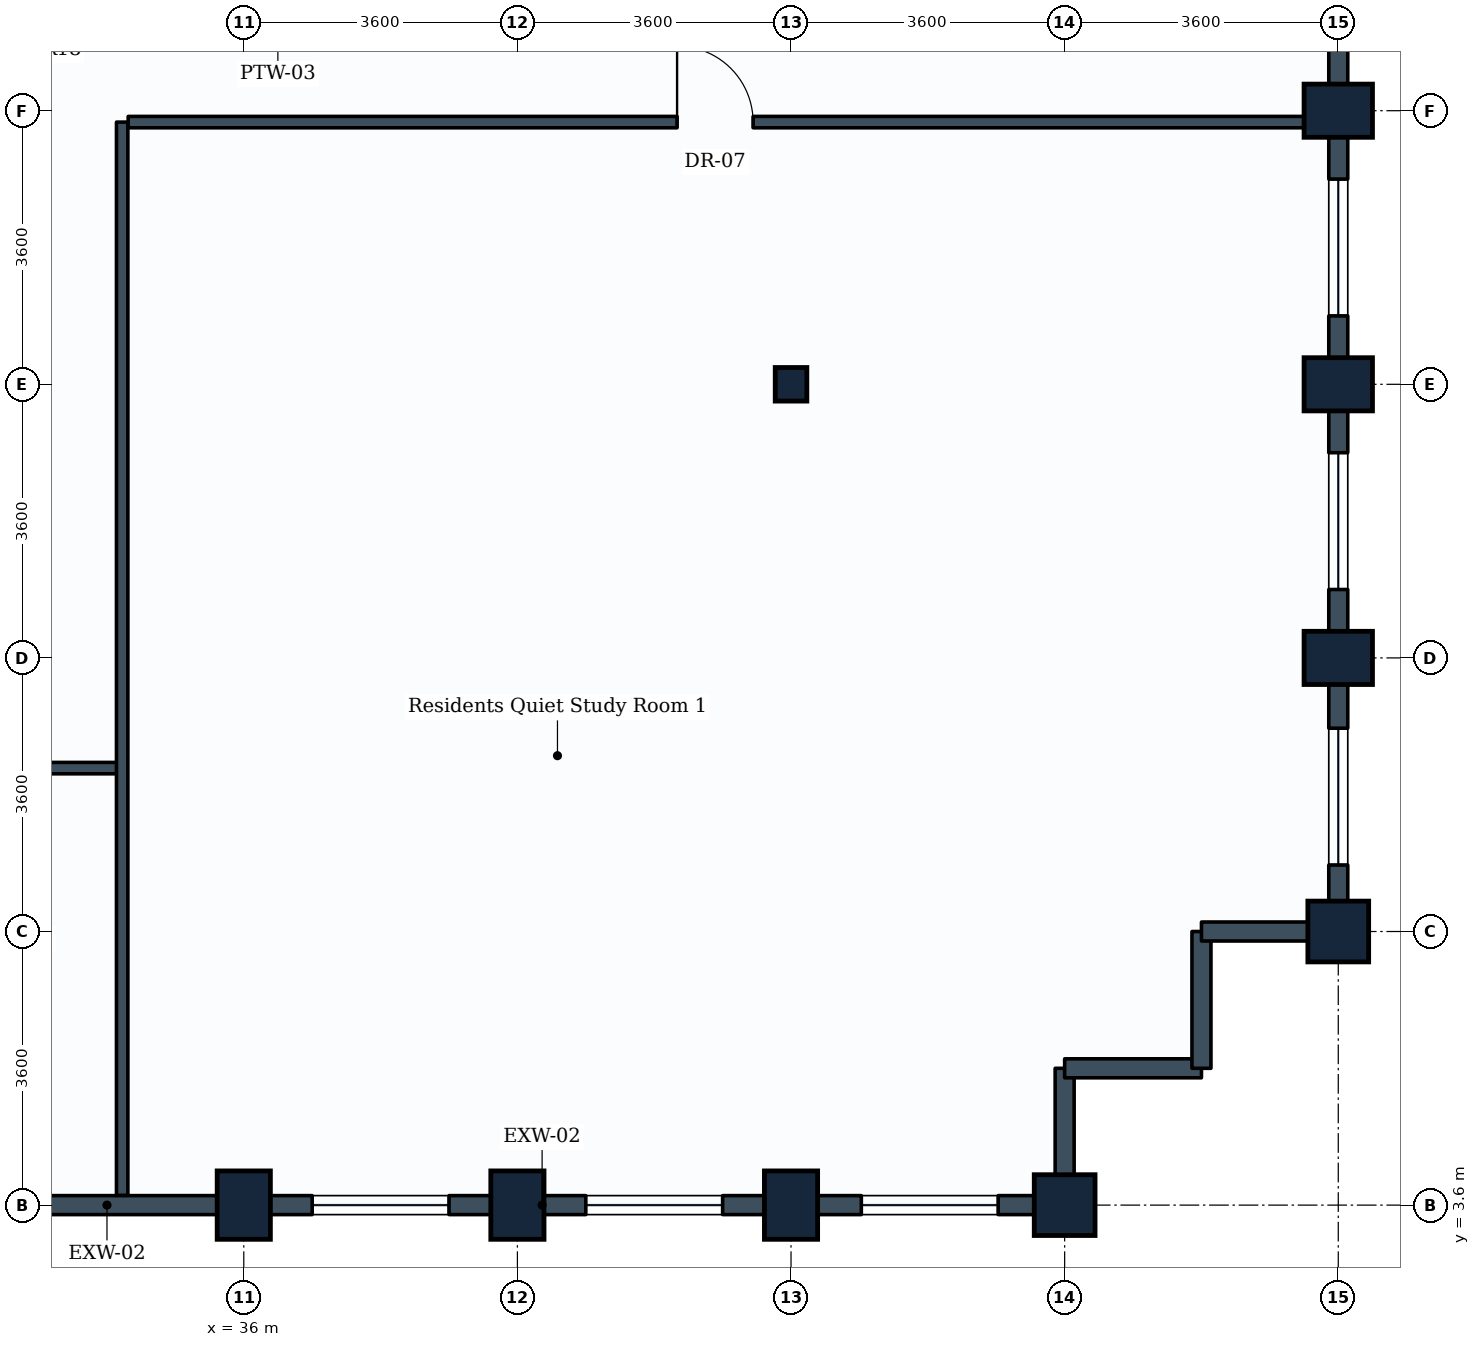
"""IFC4 building model, lengths in metres.
Left out: names, types, materials, properties, quantities, classifications, styles, units other than length and angle.
Written with IfcOpenShell. Run it as: python <this file> out.ifc"""

import sys

from ifc_helpers import new_model, si_unit, direction, frame, frame_2d, origin, origin_2d, place, context, subcontext, project, spatial, rectangle, i_section, extrude, element, fill, save


model = new_model("IFC4")
c1 = context("Model", 3, precision=1e-05, world=origin(), true_north=direction((0.0, 1.0)))
c2 = subcontext(c1, "Body", "Model", "MODEL_VIEW")
j1 = project(units=[si_unit("LENGTHUNIT", "METRE"), si_unit("PLANEANGLEUNIT", "RADIAN")], contexts=[c1])
p1 = place(None, origin())
s1 = spatial("IfcSite", under=j1, at=p1, CompositionType="ELEMENT")
p2 = place(p1, origin())
s2 = spatial("IfcBuilding", under=s1, at=p2, CompositionType="ELEMENT")
p3 = place(p2, frame((0.0, 0.0, 190.0)))
s3 = spatial("IfcBuildingStorey", under=s2, at=p3, CompositionType="ELEMENT", Elevation=190.0)
for number, where, z_axis, x_axis in (
    (1, (36.0, 3.6, 0.0), (0.0, 0.0, 1.0), (1.0, 0.0, 0.0)),
    (2, (39.6, 3.6, 0.0), (0.0, 0.0, 1.0), (1.0, 0.0, 0.0)),
    (3, (43.2, 3.6, 0.0), (0.0, 0.0, 1.0), (1.0, 0.0, 0.0)),
):
    element("IfcColumn", number, at=place(p3, frame(where, z_axis=z_axis, x_axis=x_axis)), inside=s3, PredefinedType="COLUMN", context=c2, shape_type="SweptSolid", body=[
        extrude(rectangle(XDim=0.7, YDim=0.9, at=origin_2d()), origin(), (0.0, 0.0, 1.0), 3.8),
    ])
p4 = place(p3, frame((43.2, 14.4, 0.0), z_axis=(0.0, 0.0, 1.0), x_axis=(1.0, 0.0, 0.0)))
e4 = element("IfcColumn", 4, at=p4, inside=s3, PredefinedType="COLUMN", context=c2, shape_type="SweptSolid", body=[
    extrude(i_section(OverallWidth=0.416, OverallDepth=0.442, WebThickness=0.025, FlangeThickness=0.041, FilletRadius=0.015, at=origin_2d()), origin(), (0.0, 0.0, 1.0), 3.8),
])
for number, where, z_axis, x_axis in (
    (5, (46.8, 3.6, 0.0), (0.0, 0.0, 1.0), (1.0, 0.0, 0.0)),
    (6, (50.4, 7.2, 0.0), (0.0, 0.0, 1.0), (1.0, 0.0, 0.0)),
):
    element("IfcColumn", number, at=place(p3, frame(where, z_axis=z_axis, x_axis=x_axis)), inside=s3, PredefinedType="COLUMN", context=c2, shape_type="SweptSolid", body=[
        extrude(rectangle(XDim=0.8, YDim=0.8, at=origin_2d()), origin(), (0.0, 0.0, 1.0), 3.8),
    ])
for number, where, z_axis, x_axis in (
    (7, (50.4, 10.8, 0.0), (0.0, 0.0, 1.0), (0.0, 1.0, 0.0)),
    (8, (50.4, 14.4, 0.0), (0.0, 0.0, 1.0), (0.0, 1.0, 0.0)),
    (9, (50.4, 18.0, 0.0), (0.0, 0.0, 1.0), (0.0, 1.0, 0.0)),
):
    element("IfcColumn", number, at=place(p3, frame(where, z_axis=z_axis, x_axis=x_axis)), inside=s3, PredefinedType="COLUMN", context=c2, shape_type="SweptSolid", body=[
        extrude(rectangle(XDim=0.7, YDim=0.9, at=origin_2d()), origin(), (0.0, 0.0, 1.0), 3.8),
    ])
p5 = place(p3, frame((36.0, 3.6, 0.0), z_axis=(0.0, 0.0, 1.0), x_axis=(-1.0, 0.0, 0.0)))
e10 = element("IfcWall", 10, at=p5, inside=s3, PredefinedType="STANDARD", context=c2, shape_type="SweptSolid", body=[
    extrude(rectangle(XDim=3.6, YDim=0.25, at=frame_2d((1.8, 0.0))), origin(), (0.0, 0.0, 1.0), 2.93),
])
p6 = place(p3, frame((39.6, 3.6, 0.0), z_axis=(0.0, 0.0, 1.0), x_axis=(-1.0, 0.0, 0.0)))
e11 = element("IfcWall", 11, at=p6, inside=s3, PredefinedType="STANDARD", context=c2, shape_type="SweptSolid", body=[
    extrude(rectangle(XDim=3.6, YDim=0.25, at=frame_2d((1.8, 0.0))), origin(), (0.0, 0.0, 1.0), 2.93),
])
p7 = place(p6, frame((0.9, 0.0, 0.85)))
e12 = element("IfcOpeningElement", 12, at=p7, cuts=e11, PredefinedType="OPENING", context=c2, shape_type="SweptSolid", body=[
    extrude(rectangle(XDim=1.8, YDim=1.35, at=frame_2d((0.9, 0.675))), frame((0.0, 0.135, 0.0), z_axis=(0.0, -1.0, 0.0), x_axis=(1.0, 0.0, 0.0)), (0.0, 0.0, 1.0), 0.27),
])
p8 = place(p3, frame((43.2, 3.6, 0.0), z_axis=(0.0, 0.0, 1.0), x_axis=(-1.0, 0.0, 0.0)))
e13 = element("IfcWall", 13, at=p8, inside=s3, PredefinedType="STANDARD", context=c2, shape_type="SweptSolid", body=[
    extrude(rectangle(XDim=3.6, YDim=0.25, at=frame_2d((1.8, 0.0))), origin(), (0.0, 0.0, 1.0), 2.93),
])
p9 = place(p8, frame((0.9, 0.0, 0.85)))
e14 = element("IfcOpeningElement", 14, at=p9, cuts=e13, PredefinedType="OPENING", context=c2, shape_type="SweptSolid", body=[
    extrude(rectangle(XDim=1.8, YDim=1.35, at=frame_2d((0.9, 0.675))), frame((0.0, 0.135, 0.0), z_axis=(0.0, -1.0, 0.0), x_axis=(1.0, 0.0, 0.0)), (0.0, 0.0, 1.0), 0.27),
])
p10 = place(p3, frame((46.8, 3.6, 0.0), z_axis=(0.0, 0.0, 1.0), x_axis=(-1.0, 0.0, 0.0)))
e15 = element("IfcWall", 15, at=p10, inside=s3, PredefinedType="STANDARD", context=c2, shape_type="SweptSolid", body=[
    extrude(rectangle(XDim=3.6, YDim=0.25, at=frame_2d((1.8, 0.0))), origin(), (0.0, 0.0, 1.0), 2.93),
])
p11 = place(p10, frame((0.875, 0.0, 0.85)))
e16 = element("IfcOpeningElement", 16, at=p11, cuts=e15, PredefinedType="OPENING", context=c2, shape_type="SweptSolid", body=[
    extrude(rectangle(XDim=1.8, YDim=1.35, at=frame_2d((0.9, 0.675))), frame((0.0, 0.135, 0.0), z_axis=(0.0, -1.0, 0.0), x_axis=(1.0, 0.0, 0.0)), (0.0, 0.0, 1.0), 0.27),
])
p12 = place(p3, frame((46.8, 5.4, 0.0), z_axis=(0.0, 0.0, 1.0), x_axis=(0.0, -1.0, 0.0)))
e17 = element("IfcWall", 17, at=p12, inside=s3, PredefinedType="STANDARD", context=c2, shape_type="SweptSolid", body=[
    extrude(rectangle(XDim=1.8, YDim=0.25, at=frame_2d((0.9, 0.0))), origin(), (0.0, 0.0, 1.0), 2.93),
])
for number, where, z_axis, x_axis in (
    (18, (48.6, 5.4, 0.0), (0.0, 0.0, 1.0), (-1.0, 0.0, 0.0)),
    (19, (48.6, 7.2, 0.0), (0.0, 0.0, 1.0), (0.0, -1.0, 0.0)),
):
    element("IfcWall", number, at=place(p3, frame(where, z_axis=z_axis, x_axis=x_axis)), inside=s3, PredefinedType="STANDARD", context=c2, shape_type="SweptSolid", body=[
        extrude(rectangle(XDim=1.8, YDim=0.25, at=frame_2d((0.9, 0.0))), origin(), (0.0, 0.0, 1.0), 3.535),
    ])
p13 = place(p3, frame((50.4, 7.2, 0.0), z_axis=(0.0, 0.0, 1.0), x_axis=(-1.0, 0.0, 0.0)))
e20 = element("IfcWall", 20, at=p13, inside=s3, PredefinedType="STANDARD", context=c2, shape_type="SweptSolid", body=[
    extrude(rectangle(XDim=1.8, YDim=0.25, at=frame_2d((0.9, 0.0))), origin(), (0.0, 0.0, 1.0), 2.93),
])
p14 = place(p3, frame((50.4, 10.8, 0.0), z_axis=(0.0, 0.0, 1.0), x_axis=(0.0, -1.0, 0.0)))
e21 = element("IfcWall", 21, at=p14, inside=s3, PredefinedType="STANDARD", context=c2, shape_type="SweptSolid", body=[
    extrude(rectangle(XDim=3.6, YDim=0.25, at=frame_2d((1.8, 0.0))), origin(), (0.0, 0.0, 1.0), 2.93),
])
p15 = place(p14, frame((0.925, 0.0, 0.85)))
e22 = element("IfcOpeningElement", 22, at=p15, cuts=e21, PredefinedType="OPENING", context=c2, shape_type="SweptSolid", body=[
    extrude(rectangle(XDim=1.8, YDim=1.35, at=frame_2d((0.9, 0.675))), frame((0.0, 0.135, 0.0), z_axis=(0.0, -1.0, 0.0), x_axis=(1.0, 0.0, 0.0)), (0.0, 0.0, 1.0), 0.27),
])
p16 = place(p3, frame((50.4, 14.4, 0.0), z_axis=(0.0, 0.0, 1.0), x_axis=(0.0, -1.0, 0.0)))
e23 = element("IfcWall", 23, at=p16, inside=s3, PredefinedType="STANDARD", context=c2, shape_type="SweptSolid", body=[
    extrude(rectangle(XDim=3.6, YDim=0.25, at=frame_2d((1.8, 0.0))), origin(), (0.0, 0.0, 1.0), 2.93),
])
p17 = place(p16, frame((0.9, 0.0, 0.85)))
e24 = element("IfcOpeningElement", 24, at=p17, cuts=e23, PredefinedType="OPENING", context=c2, shape_type="SweptSolid", body=[
    extrude(rectangle(XDim=1.8, YDim=1.35, at=frame_2d((0.9, 0.675))), frame((0.0, 0.135, 0.0), z_axis=(0.0, -1.0, 0.0), x_axis=(1.0, 0.0, 0.0)), (0.0, 0.0, 1.0), 0.27),
])
p18 = place(p3, frame((50.4, 18.0, 0.0), z_axis=(0.0, 0.0, 1.0), x_axis=(0.0, -1.0, 0.0)))
e25 = element("IfcWall", 25, at=p18, inside=s3, PredefinedType="STANDARD", context=c2, shape_type="SweptSolid", body=[
    extrude(rectangle(XDim=3.6, YDim=0.25, at=frame_2d((1.8, 0.0))), origin(), (0.0, 0.0, 1.0), 2.93),
])
p19 = place(p18, frame((0.9, 0.0, 0.85)))
e26 = element("IfcOpeningElement", 26, at=p19, cuts=e25, PredefinedType="OPENING", context=c2, shape_type="SweptSolid", body=[
    extrude(rectangle(XDim=1.8, YDim=1.35, at=frame_2d((0.9, 0.675))), frame((0.0, 0.135, 0.0), z_axis=(0.0, -1.0, 0.0), x_axis=(1.0, 0.0, 0.0)), (0.0, 0.0, 1.0), 0.27),
])
p20 = place(p3, frame((50.4, 21.6, 0.0), z_axis=(0.0, 0.0, 1.0), x_axis=(0.0, -1.0, 0.0)))
e27 = element("IfcWall", 27, at=p20, inside=s3, PredefinedType="STANDARD", context=c2, shape_type="SweptSolid", body=[
    extrude(rectangle(XDim=3.6, YDim=0.25, at=frame_2d((1.8, 0.0))), origin(), (0.0, 0.0, 1.0), 2.93),
])
p21 = place(p3, frame((28.879, 9.35, 0.0), z_axis=(0.0, 0.0, 1.0), x_axis=(1.0, 0.0, 0.0)))
e28 = element("IfcWall", 28, at=p21, inside=s3, PredefinedType="PARTITIONING", context=c2, shape_type="SweptSolid", body=[
    extrude(rectangle(XDim=5.521, YDim=0.15, at=frame_2d((2.76, 0.0))), origin(), (0.0, 0.0, 1.0), 3.535),
])
p22 = place(p21, frame((0.36, 0.0, 0.0)))
e29 = element("IfcOpeningElement", 29, at=p22, cuts=e28, PredefinedType="OPENING", context=c2, shape_type="SweptSolid", body=[
    extrude(rectangle(XDim=1.0, YDim=2.1, at=frame_2d((0.5, 1.05))), frame((0.0, 0.085, 0.0), z_axis=(0.0, -1.0, 0.0), x_axis=(1.0, 0.0, 0.0)), (0.0, 0.0, 1.0), 0.17),
])
p23 = place(p3, frame((34.4, 3.729, 0.0), z_axis=(0.0, 0.0, 1.0), x_axis=(0.0, 1.0, 0.0)))
e30 = element("IfcWall", 30, at=p23, inside=s3, PredefinedType="PARTITIONING", context=c2, shape_type="SweptSolid", body=[
    extrude(rectangle(XDim=14.121, YDim=0.15, at=frame_2d((7.061, 0.0))), origin(), (0.0, 0.0, 1.0), 2.93),
])
p24 = place(p3, frame((34.479, 17.85, 0.0), z_axis=(0.0, 0.0, 1.0), x_axis=(1.0, 0.0, 0.0)))
e31 = element("IfcWall", 31, at=p24, inside=s3, PredefinedType="PARTITIONING", context=c2, shape_type="SweptSolid", body=[
    extrude(rectangle(XDim=15.792, YDim=0.15, at=frame_2d((7.896, 0.0))), origin(), (0.0, 0.0, 1.0), 2.93),
])
p25 = place(p24, frame((7.222, 0.0, 0.0)))
e32 = element("IfcOpeningElement", 32, at=p25, cuts=e31, PredefinedType="OPENING", context=c2, shape_type="SweptSolid", body=[
    extrude(rectangle(XDim=1.0, YDim=2.1, at=frame_2d((0.5, 1.05))), frame((0.0, 0.085, 0.0), z_axis=(0.0, -1.0, 0.0), x_axis=(1.0, 0.0, 0.0)), (0.0, 0.0, 1.0), 0.17),
])
p26 = place(p7, origin())
e33 = element("IfcWindow", 33, at=p26, inside=s3, PartitioningType="SINGLE_PANEL", PredefinedType="WINDOW", context=c2, shape_type="SweptSolid", body=[
    extrude(rectangle(XDim=1.8, YDim=1.35, at=frame_2d((0.9, 0.675))), frame((0.0, 0.03, 0.0), z_axis=(0.0, -1.0, 0.0), x_axis=(1.0, 0.0, 0.0)), (0.0, 0.0, 1.0), 0.06),
])
fill(e12, e33)
p27 = place(p9, origin())
e34 = element("IfcWindow", 34, at=p27, inside=s3, PartitioningType="SINGLE_PANEL", PredefinedType="WINDOW", context=c2, shape_type="SweptSolid", body=[
    extrude(rectangle(XDim=1.8, YDim=1.35, at=frame_2d((0.9, 0.675))), frame((0.0, 0.03, 0.0), z_axis=(0.0, -1.0, 0.0), x_axis=(1.0, 0.0, 0.0)), (0.0, 0.0, 1.0), 0.06),
])
fill(e14, e34)
p28 = place(p11, origin())
e35 = element("IfcWindow", 35, at=p28, inside=s3, PartitioningType="SINGLE_PANEL", PredefinedType="WINDOW", context=c2, shape_type="SweptSolid", body=[
    extrude(rectangle(XDim=1.8, YDim=1.35, at=frame_2d((0.9, 0.675))), frame((0.0, 0.03, 0.0), z_axis=(0.0, -1.0, 0.0), x_axis=(1.0, 0.0, 0.0)), (0.0, 0.0, 1.0), 0.06),
])
fill(e16, e35)
p29 = place(p15, origin())
e36 = element("IfcWindow", 36, at=p29, inside=s3, PartitioningType="SINGLE_PANEL", PredefinedType="WINDOW", context=c2, shape_type="SweptSolid", body=[
    extrude(rectangle(XDim=1.8, YDim=1.35, at=frame_2d((0.9, 0.675))), frame((0.0, 0.03, 0.0), z_axis=(0.0, -1.0, 0.0), x_axis=(1.0, 0.0, 0.0)), (0.0, 0.0, 1.0), 0.06),
])
fill(e22, e36)
p30 = place(p17, origin())
e37 = element("IfcWindow", 37, at=p30, inside=s3, PartitioningType="SINGLE_PANEL", PredefinedType="WINDOW", context=c2, shape_type="SweptSolid", body=[
    extrude(rectangle(XDim=1.8, YDim=1.35, at=frame_2d((0.9, 0.675))), frame((0.0, 0.03, 0.0), z_axis=(0.0, -1.0, 0.0), x_axis=(1.0, 0.0, 0.0)), (0.0, 0.0, 1.0), 0.06),
])
fill(e24, e37)
p31 = place(p19, origin())
e38 = element("IfcWindow", 38, at=p31, inside=s3, PartitioningType="SINGLE_PANEL", PredefinedType="WINDOW", context=c2, shape_type="SweptSolid", body=[
    extrude(rectangle(XDim=1.8, YDim=1.35, at=frame_2d((0.9, 0.675))), frame((0.0, 0.03, 0.0), z_axis=(0.0, -1.0, 0.0), x_axis=(1.0, 0.0, 0.0)), (0.0, 0.0, 1.0), 0.06),
])
fill(e26, e38)
p32 = place(p25, origin())
e39 = element("IfcDoor", 39, at=p32, inside=s3, OperationType="SINGLE_SWING_LEFT", PredefinedType="DOOR", context=c2, shape_type="SweptSolid", body=[
    extrude(rectangle(XDim=1.0, YDim=2.1, at=frame_2d((0.5, 1.05))), frame((0.0, 0.025, 0.0), z_axis=(0.0, -1.0, 0.0), x_axis=(1.0, 0.0, 0.0)), (0.0, 0.0, 1.0), 0.05),
])
fill(e32, e39)
save(model, sys.argv[1])
